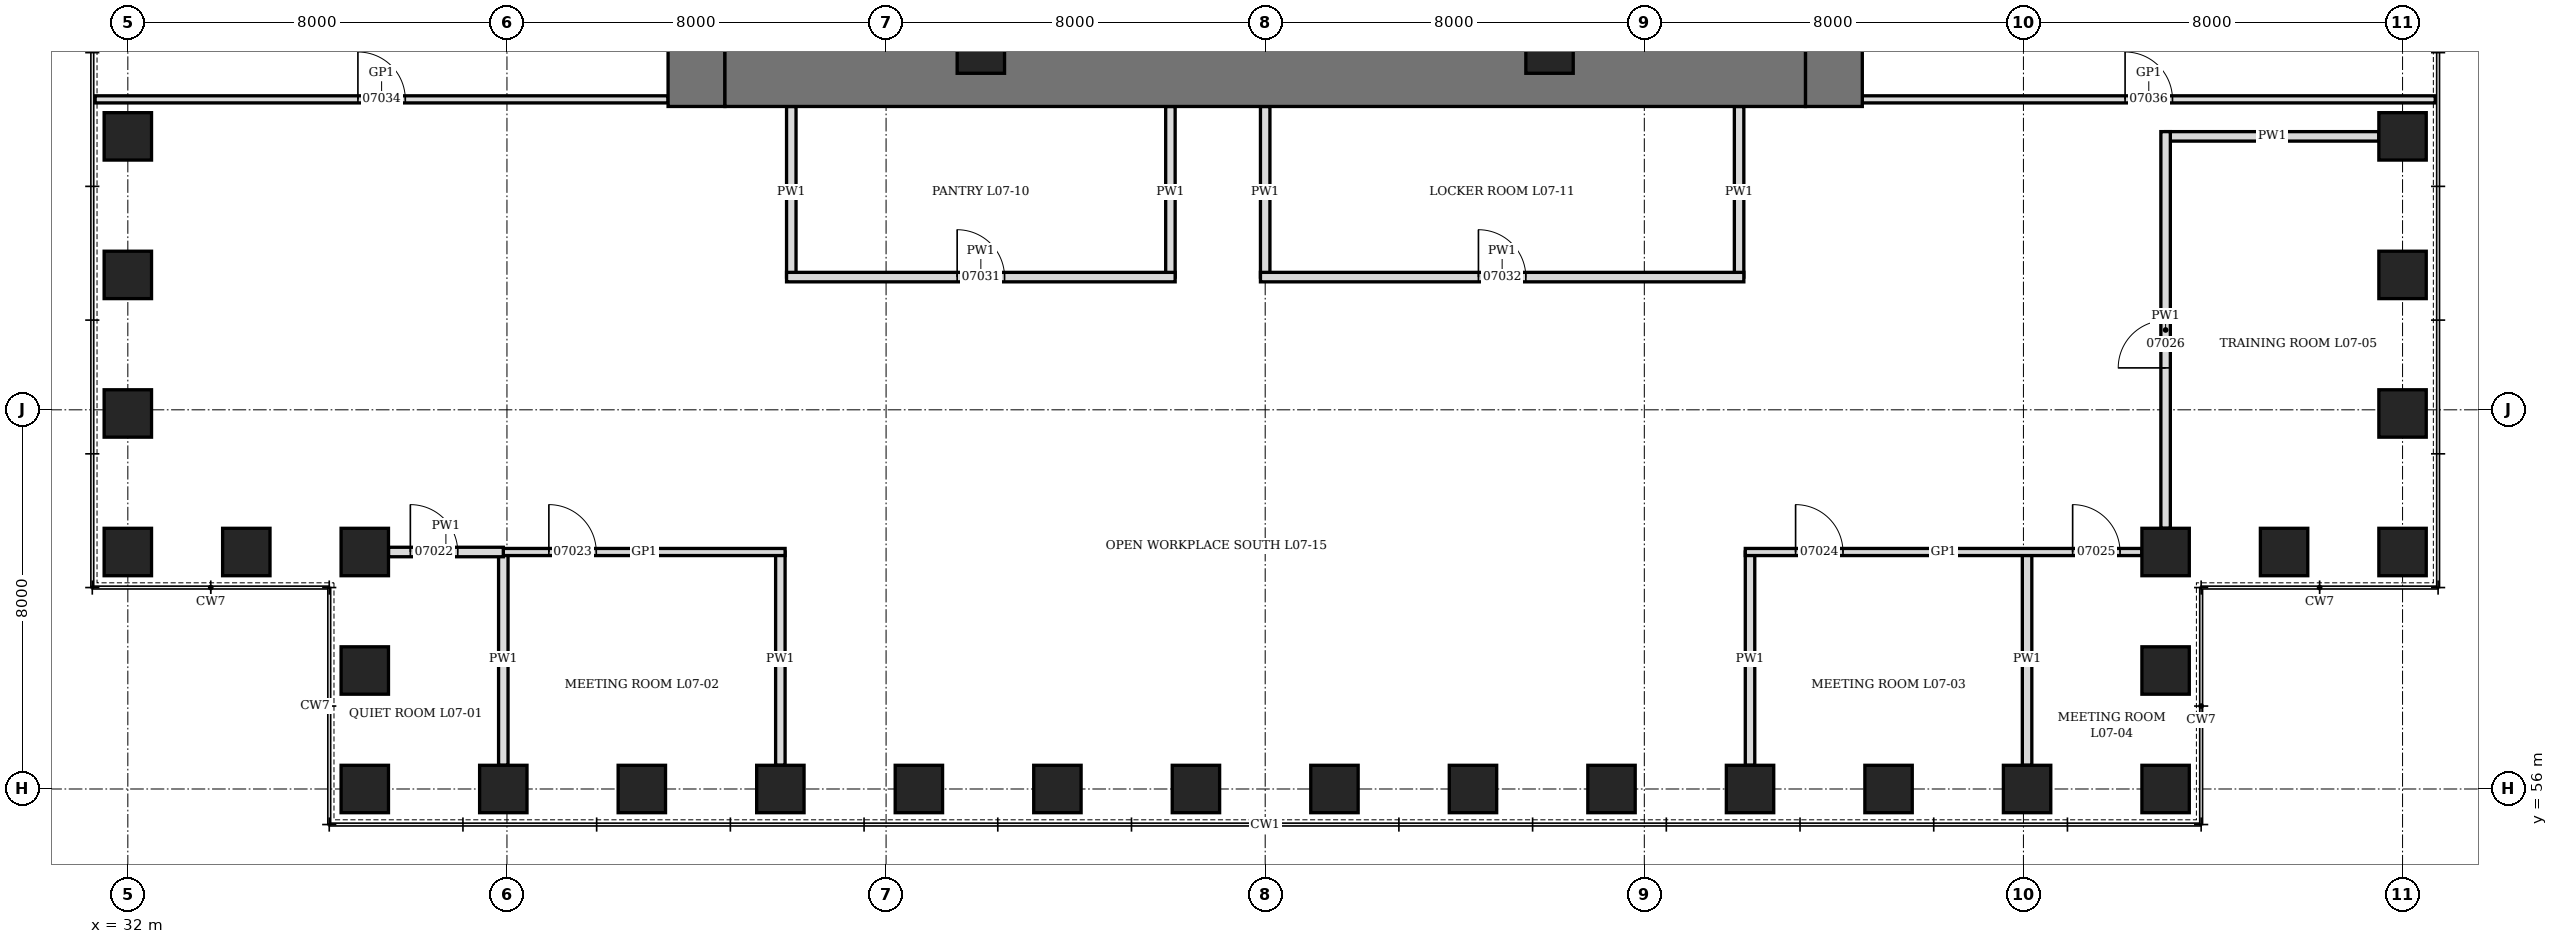
"""IFC4 building model, lengths in metres.
Left out: names, types, materials, properties, quantities, classifications, styles, units other than length and angle.
Written with IfcOpenShell. Run it as: python <this file> out.ifc"""

import sys

from ifc_helpers import new_model, si_unit, direction, frame, frame_2d, origin, origin_2d, place, context, subcontext, project, spatial, rectangle, hollow_rectangle, extrude, element, fill, save


model = new_model("IFC4")
c1 = context("Model", 3, precision=1e-05, world=origin(), true_north=direction((0.0, 1.0)))
c2 = subcontext(c1, "Body", "Model", "MODEL_VIEW")
j1 = project(units=[si_unit("LENGTHUNIT", "METRE"), si_unit("PLANEANGLEUNIT", "RADIAN")], contexts=[c1])
p1 = place(None, origin())
s1 = spatial("IfcSite", under=j1, at=p1, CompositionType="ELEMENT")
p2 = place(p1, origin())
s2 = spatial("IfcBuilding", under=s1, at=p2, CompositionType="ELEMENT")
p3 = place(p2, frame((0.0, 0.0, 39.1)))
s3 = spatial("IfcBuildingStorey", under=s2, at=p3, CompositionType="ELEMENT", Elevation=39.1)
for number, where, z_axis, x_axis in (
    (1, (37.0, 56.0, 0.0), (0.0, 0.0, 1.0), (1.0, 0.0, 0.0)),
    (2, (39.923, 56.0, 0.0), (0.0, 0.0, 1.0), (1.0, 0.0, 0.0)),
    (3, (42.846, 56.0, 0.0), (0.0, 0.0, 1.0), (1.0, 0.0, 0.0)),
    (4, (45.769, 56.0, 0.0), (0.0, 0.0, 1.0), (1.0, 0.0, 0.0)),
    (5, (48.692, 56.0, 0.0), (0.0, 0.0, 1.0), (1.0, 0.0, 0.0)),
    (6, (51.615, 56.0, 0.0), (0.0, 0.0, 1.0), (1.0, 0.0, 0.0)),
    (7, (54.539, 56.0, 0.0), (0.0, 0.0, 1.0), (1.0, 0.0, 0.0)),
    (8, (57.461, 56.0, 0.0), (0.0, 0.0, 1.0), (1.0, 0.0, 0.0)),
    (9, (60.385, 56.0, 0.0), (0.0, 0.0, 1.0), (1.0, 0.0, 0.0)),
    (10, (63.308, 56.0, 0.0), (0.0, 0.0, 1.0), (1.0, 0.0, 0.0)),
    (11, (66.231, 56.0, 0.0), (0.0, 0.0, 1.0), (1.0, 0.0, 0.0)),
    (12, (69.154, 56.0, 0.0), (0.0, 0.0, 1.0), (1.0, 0.0, 0.0)),
    (13, (72.077, 56.0, 0.0), (0.0, 0.0, 1.0), (1.0, 0.0, 0.0)),
    (14, (75.0, 56.0, 0.0), (0.0, 0.0, 1.0), (0.0, 1.0, 0.0)),
    (15, (75.0, 58.5, 0.0), (0.0, 0.0, 1.0), (0.0, 1.0, 0.0)),
    (16, (75.0, 61.0, 0.0), (0.0, 0.0, 1.0), (1.0, 0.0, 0.0)),
    (17, (77.5, 61.0, 0.0), (0.0, 0.0, 1.0), (1.0, 0.0, 0.0)),
    (18, (80.0, 61.0, 0.0), (0.0, 0.0, 1.0), (0.0, 1.0, 0.0)),
    (19, (80.0, 63.923, 0.0), (0.0, 0.0, 1.0), (0.0, 1.0, 0.0)),
    (20, (80.0, 66.846, 0.0), (0.0, 0.0, 1.0), (0.0, 1.0, 0.0)),
    (21, (80.0, 69.769, 0.0), (0.0, 0.0, 1.0), (0.0, 1.0, 0.0)),
    (22, (32.0, 69.769, 0.0), (0.0, 0.0, 1.0), (0.0, 1.0, 0.0)),
    (23, (32.0, 66.846, 0.0), (0.0, 0.0, 1.0), (0.0, 1.0, 0.0)),
    (24, (32.0, 63.923, 0.0), (0.0, 0.0, 1.0), (0.0, 1.0, 0.0)),
    (25, (32.0, 61.0, 0.0), (0.0, 0.0, 1.0), (1.0, 0.0, 0.0)),
    (26, (34.5, 61.0, 0.0), (0.0, 0.0, 1.0), (1.0, 0.0, 0.0)),
    (27, (37.0, 61.0, 0.0), (0.0, 0.0, 1.0), (0.0, 1.0, 0.0)),
    (28, (37.0, 58.5, 0.0), (0.0, 0.0, 1.0), (0.0, 1.0, 0.0)),
):
    element("IfcColumn", number, at=place(p3, frame(where, z_axis=z_axis, x_axis=x_axis)), inside=s3, PredefinedType="COLUMN", context=c2, shape_type="SweptSolid", body=[
        extrude(hollow_rectangle(XDim=1.0, YDim=1.0, WallThickness=0.35, at=origin_2d()), origin(), (0.0, 0.0, 1.0), 4.2),
    ])
p4 = place(p3, frame((44.0, 70.4, 0.0), z_axis=(0.0, 0.0, 1.0), x_axis=(0.0, 1.0, 0.0)))
e29 = element("IfcWall", 29, at=p4, inside=s3, PredefinedType="SHEAR", context=c2, shape_type="SweptSolid", body=[
    extrude(rectangle(XDim=19.2, YDim=1.2, at=frame_2d((9.6, 0.0))), origin(), (0.0, 0.0, 1.0), 4.2),
])
p5 = place(p4, frame((8.6, 0.0, 0.0)))
e30 = element("IfcOpeningElement", 30, at=p5, cuts=e29, PredefinedType="OPENING", context=c2, shape_type="SweptSolid", body=[
    extrude(rectangle(XDim=2.0, YDim=2.4, at=frame_2d((1.0, 1.2))), frame((0.0, 0.61, 0.0), z_axis=(0.0, -1.0, 0.0), x_axis=(1.0, 0.0, 0.0)), (0.0, 0.0, 1.0), 1.22),
])
p6 = place(p3, frame((68.0, 70.4, 0.0), z_axis=(0.0, 0.0, 1.0), x_axis=(0.0, 1.0, 0.0)))
e31 = element("IfcWall", 31, at=p6, inside=s3, PredefinedType="SHEAR", context=c2, shape_type="SweptSolid", body=[
    extrude(rectangle(XDim=19.2, YDim=1.2, at=frame_2d((9.6, 0.0))), origin(), (0.0, 0.0, 1.0), 4.2),
])
p7 = place(p6, frame((8.6, 0.0, 0.0)))
e32 = element("IfcOpeningElement", 32, at=p7, cuts=e31, PredefinedType="OPENING", context=c2, shape_type="SweptSolid", body=[
    extrude(rectangle(XDim=2.0, YDim=2.4, at=frame_2d((1.0, 1.2))), frame((0.0, 0.61, 0.0), z_axis=(0.0, -1.0, 0.0), x_axis=(1.0, 0.0, 0.0)), (0.0, 0.0, 1.0), 1.22),
])
p8 = place(p3, frame((44.6, 71.0, 0.0), z_axis=(0.0, 0.0, 1.0), x_axis=(1.0, 0.0, 0.0)))
e33 = element("IfcWall", 33, at=p8, inside=s3, PredefinedType="SHEAR", context=c2, shape_type="SweptSolid", body=[
    extrude(rectangle(XDim=22.8, YDim=1.2, at=frame_2d((11.4, 0.0))), origin(), (0.0, 0.0, 1.0), 4.2),
])
for number, where, z_axis, x_axis in (
    (34, (50.0, 71.6, 0.0), (0.0, 0.0, 1.0), (1.0, 0.0, 0.0)),
    (35, (62.0, 71.6, 0.0), (0.0, 0.0, 1.0), (1.0, 0.0, 0.0)),
):
    element("IfcColumn", number, at=place(p3, frame(where, z_axis=z_axis, x_axis=x_axis)), inside=s3, PredefinedType="COLUMN", context=c2, shape_type="SweptSolid", body=[
        extrude(hollow_rectangle(XDim=1.0, YDim=1.0, WallThickness=0.15, at=origin_2d()), origin(), (0.0, 0.0, 1.0), 4.2),
    ])
p9 = place(p3, frame((39.923, 56.5, 0.0), z_axis=(0.0, 0.0, 1.0), x_axis=(0.0, 1.0, 0.0)))
e36 = element("IfcWall", 36, at=p9, inside=s3, PredefinedType="PARTITIONING", context=c2, shape_type="SweptSolid", body=[
    extrude(rectangle(XDim=4.5, YDim=0.2, at=frame_2d((2.25, 0.0))), origin(), (0.0, 0.0, 1.0), 3.428),
])
for number, where, z_axis, x_axis in (
    (37, (45.769, 56.5, 0.0), (0.0, 0.0, 1.0), (0.0, 1.0, 0.0)),
    (38, (66.231, 56.5, 0.0), (0.0, 0.0, 1.0), (0.0, 1.0, 0.0)),
):
    element("IfcWall", number, at=place(p3, frame(where, z_axis=z_axis, x_axis=x_axis)), inside=s3, PredefinedType="PARTITIONING", context=c2, shape_type="SweptSolid", body=[
        extrude(rectangle(XDim=4.5, YDim=0.2, at=frame_2d((2.25, 0.0))), origin(), (0.0, 0.0, 1.0), 3.278),
    ])
for number, where, z_axis, x_axis in (
    (39, (72.077, 56.5, 0.0), (0.0, 0.0, 1.0), (0.0, 1.0, 0.0)),
    (40, (75.0, 69.769, 0.0), (0.0, 0.0, 1.0), (1.0, 0.0, 0.0)),
):
    element("IfcWall", number, at=place(p3, frame(where, z_axis=z_axis, x_axis=x_axis)), inside=s3, PredefinedType="PARTITIONING", context=c2, shape_type="SweptSolid", body=[
        extrude(rectangle(XDim=4.5, YDim=0.2, at=frame_2d((2.25, 0.0))), origin(), (0.0, 0.0, 1.0), 3.428),
    ])
for number, where, z_axis, x_axis in (
    (41, (46.0, 66.8, 0.0), (0.0, 0.0, 1.0), (0.0, 1.0, 0.0)),
    (42, (54.0, 66.8, 0.0), (0.0, 0.0, 1.0), (0.0, 1.0, 0.0)),
    (43, (56.0, 66.8, 0.0), (0.0, 0.0, 1.0), (0.0, 1.0, 0.0)),
    (44, (66.0, 66.8, 0.0), (0.0, 0.0, 1.0), (0.0, 1.0, 0.0)),
):
    element("IfcWall", number, at=place(p3, frame(where, z_axis=z_axis, x_axis=x_axis)), inside=s3, PredefinedType="PARTITIONING", context=c2, shape_type="SweptSolid", body=[
        extrude(rectangle(XDim=3.6, YDim=0.2, at=frame_2d((1.8, 0.0))), origin(), (0.0, 0.0, 1.0), 4.04),
    ])
p10 = place(p3, frame((39.923, 61.0, 0.0), z_axis=(0.0, 0.0, 1.0), x_axis=(1.0, 0.0, 0.0)))
e45 = element("IfcWall", 45, at=p10, inside=s3, PredefinedType="PARTITIONING", context=c2, shape_type="SweptSolid", body=[
    extrude(rectangle(XDim=5.946, YDim=0.15, at=frame_2d((2.973, 0.0))), origin(), (0.0, 0.0, 1.0), 4.04),
])
p11 = place(p10, frame((0.961, 0.0, 0.0)))
e46 = element("IfcOpeningElement", 46, at=p11, cuts=e45, PredefinedType="OPENING", context=c2, shape_type="SweptSolid", body=[
    extrude(rectangle(XDim=1.0, YDim=2.4, at=frame_2d((0.5, 1.2))), frame((0.0, 0.085, 0.0), z_axis=(0.0, -1.0, 0.0), x_axis=(1.0, 0.0, 0.0)), (0.0, 0.0, 1.0), 0.17),
])
p12 = place(p3, frame((66.131, 61.0, 0.0), z_axis=(0.0, 0.0, 1.0), x_axis=(1.0, 0.0, 0.0)))
e47 = element("IfcWall", 47, at=p12, inside=s3, PredefinedType="PARTITIONING", context=c2, shape_type="SweptSolid", body=[
    extrude(rectangle(XDim=8.369, YDim=0.15, at=frame_2d((4.185, 0.0))), origin(), (0.0, 0.0, 1.0), 4.04),
])
p13 = place(p12, frame((1.062, 0.0, 0.0)))
e48 = element("IfcOpeningElement", 48, at=p13, cuts=e47, PredefinedType="OPENING", context=c2, shape_type="SweptSolid", body=[
    extrude(rectangle(XDim=1.0, YDim=2.4, at=frame_2d((0.5, 1.2))), frame((0.0, 0.085, 0.0), z_axis=(0.0, -1.0, 0.0), x_axis=(1.0, 0.0, 0.0)), (0.0, 0.0, 1.0), 0.17),
])
p14 = place(p12, frame((6.908, 0.0, 0.0)))
e49 = element("IfcOpeningElement", 49, at=p14, cuts=e47, PredefinedType="OPENING", context=c2, shape_type="SweptSolid", body=[
    extrude(rectangle(XDim=1.0, YDim=2.4, at=frame_2d((0.5, 1.2))), frame((0.0, 0.085, 0.0), z_axis=(0.0, -1.0, 0.0), x_axis=(1.0, 0.0, 0.0)), (0.0, 0.0, 1.0), 0.17),
])
p15 = place(p3, frame((37.5, 61.0, 0.0), z_axis=(0.0, 0.0, 1.0), x_axis=(1.0, 0.0, 0.0)))
e50 = element("IfcWall", 50, at=p15, inside=s3, PredefinedType="PARTITIONING", context=c2, shape_type="SweptSolid", body=[
    extrude(rectangle(XDim=2.423, YDim=0.2, at=frame_2d((1.211, 0.0))), origin(), (0.0, 0.0, 1.0), 4.04),
])
p16 = place(p15, frame((0.461, 0.0, 0.0)))
e51 = element("IfcOpeningElement", 51, at=p16, cuts=e50, PredefinedType="OPENING", context=c2, shape_type="SweptSolid", body=[
    extrude(rectangle(XDim=1.0, YDim=2.1, at=frame_2d((0.5, 1.05))), frame((0.0, 0.11, 0.0), z_axis=(0.0, -1.0, 0.0), x_axis=(1.0, 0.0, 0.0)), (0.0, 0.0, 1.0), 0.22),
])
p17 = place(p3, frame((45.9, 66.8, 0.0), z_axis=(0.0, 0.0, 1.0), x_axis=(1.0, 0.0, 0.0)))
e52 = element("IfcWall", 52, at=p17, inside=s3, PredefinedType="PARTITIONING", context=c2, shape_type="SweptSolid", body=[
    extrude(rectangle(XDim=8.2, YDim=0.2, at=frame_2d((4.1, 0.0))), origin(), (0.0, 0.0, 1.0), 4.04),
])
p18 = place(p17, frame((3.6, 0.0, 0.0)))
e53 = element("IfcOpeningElement", 53, at=p18, cuts=e52, PredefinedType="OPENING", context=c2, shape_type="SweptSolid", body=[
    extrude(rectangle(XDim=1.0, YDim=2.1, at=frame_2d((0.5, 1.05))), frame((0.0, 0.11, 0.0), z_axis=(0.0, -1.0, 0.0), x_axis=(1.0, 0.0, 0.0)), (0.0, 0.0, 1.0), 0.22),
])
p19 = place(p3, frame((55.9, 66.8, 0.0), z_axis=(0.0, 0.0, 1.0), x_axis=(1.0, 0.0, 0.0)))
e54 = element("IfcWall", 54, at=p19, inside=s3, PredefinedType="PARTITIONING", context=c2, shape_type="SweptSolid", body=[
    extrude(rectangle(XDim=10.2, YDim=0.2, at=frame_2d((5.1, 0.0))), origin(), (0.0, 0.0, 1.0), 4.04),
])
p20 = place(p19, frame((4.6, 0.0, 0.0)))
e55 = element("IfcOpeningElement", 55, at=p20, cuts=e54, PredefinedType="OPENING", context=c2, shape_type="SweptSolid", body=[
    extrude(rectangle(XDim=1.0, YDim=2.1, at=frame_2d((0.5, 1.05))), frame((0.0, 0.11, 0.0), z_axis=(0.0, -1.0, 0.0), x_axis=(1.0, 0.0, 0.0)), (0.0, 0.0, 1.0), 0.22),
])
p21 = place(p3, frame((31.31, 70.55, 0.0), z_axis=(0.0, 0.0, 1.0), x_axis=(1.0, 0.0, 0.0)))
e56 = element("IfcWall", 56, at=p21, inside=s3, PredefinedType="PARTITIONING", context=c2, shape_type="SweptSolid", body=[
    extrude(rectangle(XDim=12.09, YDim=0.15, at=frame_2d((6.045, 0.0))), origin(), (0.0, 0.0, 1.0), 4.04),
])
p22 = place(p21, frame((5.545, 0.0, 0.0)))
e57 = element("IfcOpeningElement", 57, at=p22, cuts=e56, PredefinedType="OPENING", context=c2, shape_type="SweptSolid", body=[
    extrude(rectangle(XDim=1.0, YDim=2.4, at=frame_2d((0.5, 1.2))), frame((0.0, 0.085, 0.0), z_axis=(0.0, -1.0, 0.0), x_axis=(1.0, 0.0, 0.0)), (0.0, 0.0, 1.0), 0.17),
])
p23 = place(p3, frame((68.6, 70.55, 0.0), z_axis=(0.0, 0.0, 1.0), x_axis=(1.0, 0.0, 0.0)))
e58 = element("IfcWall", 58, at=p23, inside=s3, PredefinedType="PARTITIONING", context=c2, shape_type="SweptSolid", body=[
    extrude(rectangle(XDim=12.09, YDim=0.15, at=frame_2d((6.045, 0.0))), origin(), (0.0, 0.0, 1.0), 4.04),
])
p24 = place(p23, frame((5.545, 0.0, 0.0)))
e59 = element("IfcOpeningElement", 59, at=p24, cuts=e58, PredefinedType="OPENING", context=c2, shape_type="SweptSolid", body=[
    extrude(rectangle(XDim=1.0, YDim=2.4, at=frame_2d((0.5, 1.2))), frame((0.0, 0.085, 0.0), z_axis=(0.0, -1.0, 0.0), x_axis=(1.0, 0.0, 0.0)), (0.0, 0.0, 1.0), 0.17),
])
p25 = place(p3, frame((75.0, 61.5, 0.0), z_axis=(0.0, 0.0, 1.0), x_axis=(0.0, 1.0, 0.0)))
e60 = element("IfcWall", 60, at=p25, inside=s3, PredefinedType="PARTITIONING", context=c2, shape_type="SweptSolid", body=[
    extrude(rectangle(XDim=8.369, YDim=0.2, at=frame_2d((4.185, 0.0))), origin(), (0.0, 0.0, 1.0), 4.04),
])
p26 = place(p25, frame((3.385, 0.0, 0.0)))
e61 = element("IfcOpeningElement", 61, at=p26, cuts=e60, PredefinedType="OPENING", context=c2, shape_type="SweptSolid", body=[
    extrude(rectangle(XDim=1.0, YDim=2.1, at=frame_2d((0.5, 1.05))), frame((0.0, 0.11, 0.0), z_axis=(0.0, -1.0, 0.0), x_axis=(1.0, 0.0, 0.0)), (0.0, 0.0, 1.0), 0.22),
])
p27 = place(p16, origin())
e62 = element("IfcDoor", 62, at=p27, inside=s3, OperationType="SINGLE_SWING_LEFT", PredefinedType="DOOR", context=c2, shape_type="SweptSolid", body=[
    extrude(rectangle(XDim=1.0, YDim=2.1, at=frame_2d((0.5, 1.05))), frame((0.0, 0.1, 0.0), z_axis=(0.0, -1.0, 0.0), x_axis=(1.0, 0.0, 0.0)), (0.0, 0.0, 1.0), 0.199),
])
fill(e51, e62)
p28 = place(p11, origin())
e63 = element("IfcDoor", 63, at=p28, inside=s3, OperationType="SINGLE_SWING_RIGHT", PredefinedType="DOOR", context=c2, shape_type="SweptSolid", body=[
    extrude(rectangle(XDim=1.0, YDim=2.4, at=frame_2d((0.5, 1.2))), frame((0.0, 0.075, 0.0), z_axis=(0.0, -1.0, 0.0), x_axis=(1.0, 0.0, 0.0)), (0.0, 0.0, 1.0), 0.149),
])
fill(e46, e63)
p29 = place(p13, origin())
e64 = element("IfcDoor", 64, at=p29, inside=s3, OperationType="SINGLE_SWING_RIGHT", PredefinedType="DOOR", context=c2, shape_type="SweptSolid", body=[
    extrude(rectangle(XDim=1.0, YDim=2.4, at=frame_2d((0.5, 1.2))), frame((0.0, 0.075, 0.0), z_axis=(0.0, -1.0, 0.0), x_axis=(1.0, 0.0, 0.0)), (0.0, 0.0, 1.0), 0.149),
])
fill(e48, e64)
p30 = place(p14, origin())
e65 = element("IfcDoor", 65, at=p30, inside=s3, OperationType="SINGLE_SWING_RIGHT", PredefinedType="DOOR", context=c2, shape_type="SweptSolid", body=[
    extrude(rectangle(XDim=1.0, YDim=2.4, at=frame_2d((0.5, 1.2))), frame((0.0, 0.075, 0.0), z_axis=(0.0, -1.0, 0.0), x_axis=(1.0, 0.0, 0.0)), (0.0, 0.0, 1.0), 0.149),
])
fill(e49, e65)
p31 = place(p26, origin())
e66 = element("IfcDoor", 66, at=p31, inside=s3, OperationType="SINGLE_SWING_LEFT", PredefinedType="DOOR", context=c2, shape_type="SweptSolid", body=[
    extrude(rectangle(XDim=1.0, YDim=2.1, at=frame_2d((0.5, 1.05))), frame((0.0, 0.1, 0.0), z_axis=(0.0, -1.0, 0.0), x_axis=(1.0, 0.0, 0.0)), (0.0, 0.0, 1.0), 0.199),
])
fill(e61, e66)
p32 = place(p18, origin())
e67 = element("IfcDoor", 67, at=p32, inside=s3, OperationType="SINGLE_SWING_LEFT", PredefinedType="DOOR", context=c2, shape_type="SweptSolid", body=[
    extrude(rectangle(XDim=1.0, YDim=2.1, at=frame_2d((0.5, 1.05))), frame((0.0, 0.1, 0.0), z_axis=(0.0, -1.0, 0.0), x_axis=(1.0, 0.0, 0.0)), (0.0, 0.0, 1.0), 0.199),
])
fill(e53, e67)
p33 = place(p20, origin())
e68 = element("IfcDoor", 68, at=p33, inside=s3, OperationType="SINGLE_SWING_LEFT", PredefinedType="DOOR", context=c2, shape_type="SweptSolid", body=[
    extrude(rectangle(XDim=1.0, YDim=2.1, at=frame_2d((0.5, 1.05))), frame((0.0, 0.1, 0.0), z_axis=(0.0, -1.0, 0.0), x_axis=(1.0, 0.0, 0.0)), (0.0, 0.0, 1.0), 0.199),
])
fill(e55, e68)
p34 = place(p22, origin())
e69 = element("IfcDoor", 69, at=p34, inside=s3, OperationType="SINGLE_SWING_RIGHT", PredefinedType="DOOR", context=c2, shape_type="SweptSolid", body=[
    extrude(rectangle(XDim=1.0, YDim=2.4, at=frame_2d((0.5, 1.2))), frame((0.0, 0.075, 0.0), z_axis=(0.0, -1.0, 0.0), x_axis=(1.0, 0.0, 0.0)), (0.0, 0.0, 1.0), 0.149),
])
fill(e57, e69)
p35 = place(p24, origin())
e70 = element("IfcDoor", 70, at=p35, inside=s3, OperationType="SINGLE_SWING_RIGHT", PredefinedType="DOOR", context=c2, shape_type="SweptSolid", body=[
    extrude(rectangle(XDim=1.0, YDim=2.4, at=frame_2d((0.5, 1.2))), frame((0.0, 0.075, 0.0), z_axis=(0.0, -1.0, 0.0), x_axis=(1.0, 0.0, 0.0)), (0.0, 0.0, 1.0), 0.149),
])
fill(e59, e70)
save(model, sys.argv[1])
